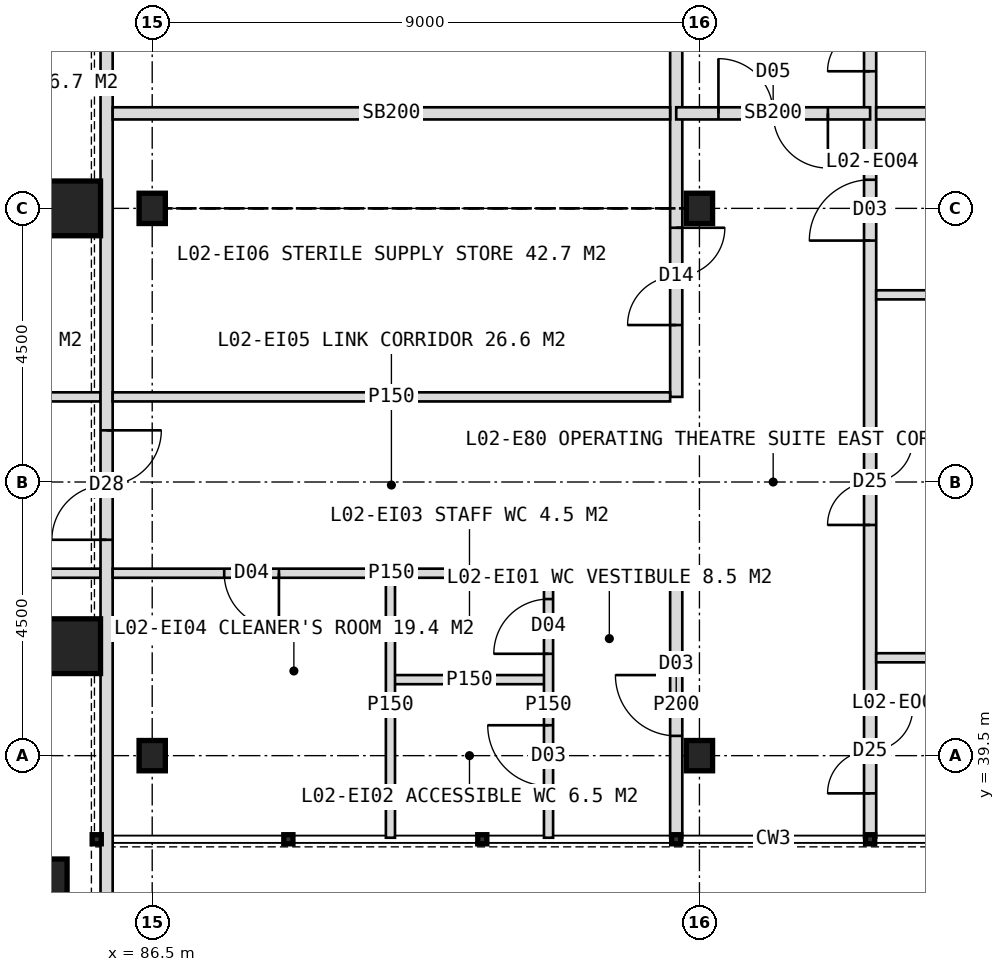
"""IFC4 building model, lengths in metres.
Left out: names, types, materials, properties, quantities, classifications, styles, units other than length and angle.
Written with IfcOpenShell. Run it as: python <this file> out.ifc"""

import sys

from ifc_helpers import new_model, si_unit, direction, frame, frame_2d, origin, origin_2d, place, context, subcontext, project, spatial, rectangle, hollow_rectangle, i_section, extrude, element, fill, save


model = new_model("IFC4")
c1 = context("Model", 3, precision=1e-05, world=origin(), true_north=direction((0.0, 1.0)))
c2 = subcontext(c1, "Body", "Model", "MODEL_VIEW")
j1 = project(units=[si_unit("LENGTHUNIT", "METRE"), si_unit("PLANEANGLEUNIT", "RADIAN")], contexts=[c1])
p1 = place(None, origin())
s1 = spatial("IfcSite", under=j1, at=p1, CompositionType="ELEMENT")
p2 = place(p1, origin())
s2 = spatial("IfcBuilding", under=s1, at=p2, CompositionType="ELEMENT")
p3 = place(p2, frame((0.0, 0.0, 11.0)))
s3 = spatial("IfcBuildingStorey", under=s2, at=p3, CompositionType="ELEMENT", Elevation=11.0)
for number, where, z_axis, x_axis in (
    (1, (85.2, 41.3, 0.0), (0.0, 0.0, 1.0), (1.0, 0.0, 0.0)),
    (2, (85.2, 48.5, 0.0), (0.0, 0.0, 1.0), (1.0, 0.0, 0.0)),
    (3, (84.65, 37.35, 0.0), (0.0, 0.0, 1.0), (1.0, 0.0, 0.0)),
):
    element("IfcColumn", number, at=place(p3, frame(where, z_axis=z_axis, x_axis=x_axis)), inside=s3, PredefinedType="COLUMN", context=c2, shape_type="SweptSolid", body=[
        extrude(hollow_rectangle(XDim=0.9, YDim=0.9, WallThickness=0.08, at=origin_2d()), origin(), (0.0, 0.0, 1.0), 5.5),
    ])
for number, where, z_axis, x_axis in (
    (4, (86.5, 39.5, 0.0), (0.0, 0.0, 1.0), (1.0, 0.0, 0.0)),
    (5, (86.5, 48.5, 0.0), (0.0, 0.0, 1.0), (1.0, 0.0, 0.0)),
    (6, (95.5, 39.5, 0.0), (0.0, 0.0, 1.0), (1.0, 0.0, 0.0)),
    (7, (95.5, 48.5, 0.0), (0.0, 0.0, 1.0), (1.0, 0.0, 0.0)),
):
    element("IfcColumn", number, at=place(p3, frame(where, z_axis=z_axis, x_axis=x_axis)), inside=s3, PredefinedType="COLUMN", context=c2, shape_type="SweptSolid", body=[
        extrude(i_section(OverallWidth=0.432, OverallDepth=0.498, WebThickness=0.056, FlangeThickness=0.089, FilletRadius=0.015, at=origin_2d()), origin(), (0.0, 0.0, 1.0), 5.5),
    ])
for number, where, z_axis, x_axis in (
    (8, (79.5, 45.4, 0.0), (0.0, 0.0, 1.0), (1.0, 0.0, 0.0)),
    (9, (79.5, 42.5, 0.0), (0.0, 0.0, 1.0), (1.0, 0.0, 0.0)),
):
    element("IfcWall", number, at=place(p3, frame(where, z_axis=z_axis, x_axis=x_axis)), inside=s3, PredefinedType="PARTITIONING", context=c2, shape_type="SweptSolid", body=[
        extrude(rectangle(XDim=6.15, YDim=0.15, at=frame_2d((3.075, 0.0))), origin(), (0.0, 0.0, 1.0), 5.2),
    ])
p4 = place(p3, frame((98.307, 38.15, 0.0), z_axis=(0.0, 0.0, 1.0), x_axis=(0.0, 1.0, 0.0)))
e10 = element("IfcWall", 10, at=p4, inside=s3, PredefinedType="PARTITIONING", context=c2, shape_type="SweptSolid", body=[
    extrude(rectangle(XDim=47.7, YDim=0.2, at=frame_2d((23.85, 0.0))), origin(), (0.0, 0.0, 1.0), 5.2),
])
p5 = place(p4, frame((45.7, 0.0, 0.0)))
e11 = element("IfcOpeningElement", 11, at=p5, cuts=e10, PredefinedType="OPENING", context=c2, shape_type="SweptSolid", body=[
    extrude(rectangle(XDim=1.2, YDim=2.1, at=frame_2d((0.6, 1.05))), frame((0.0, 0.11, 0.0), z_axis=(0.0, -1.0, 0.0), x_axis=(1.0, 0.0, 0.0)), (0.0, 0.0, 1.0), 0.22),
])
p6 = place(p4, frame((36.244, 0.0, 0.0)))
e12 = element("IfcOpeningElement", 12, at=p6, cuts=e10, PredefinedType="OPENING", context=c2, shape_type="SweptSolid", body=[
    extrude(rectangle(XDim=1.0, YDim=2.1, at=frame_2d((0.5, 1.05))), frame((0.0, 0.11, 0.0), z_axis=(0.0, -1.0, 0.0), x_axis=(1.0, 0.0, 0.0)), (0.0, 0.0, 1.0), 0.22),
])
p7 = place(p4, frame((0.73, 0.0, 0.0)))
e13 = element("IfcOpeningElement", 13, at=p7, cuts=e10, PredefinedType="OPENING", context=c2, shape_type="SweptSolid", body=[
    extrude(rectangle(XDim=1.4, YDim=2.2, at=frame_2d((0.7, 1.1))), frame((0.0, 0.11, 0.0), z_axis=(0.0, -1.0, 0.0), x_axis=(1.0, 0.0, 0.0)), (0.0, 0.0, 1.0), 0.22),
])
p8 = place(p4, frame((5.144, 0.0, 0.0)))
e14 = element("IfcOpeningElement", 14, at=p8, cuts=e10, PredefinedType="OPENING", context=c2, shape_type="SweptSolid", body=[
    extrude(rectangle(XDim=1.4, YDim=2.2, at=frame_2d((0.7, 1.1))), frame((0.0, 0.11, 0.0), z_axis=(0.0, -1.0, 0.0), x_axis=(1.0, 0.0, 0.0)), (0.0, 0.0, 1.0), 0.22),
])
p9 = place(p4, frame((9.82, 0.0, 0.0)))
e15 = element("IfcOpeningElement", 15, at=p9, cuts=e10, PredefinedType="OPENING", context=c2, shape_type="SweptSolid", body=[
    extrude(rectangle(XDim=1.0, YDim=2.1, at=frame_2d((0.5, 1.05))), frame((0.0, 0.11, 0.0), z_axis=(0.0, -1.0, 0.0), x_axis=(1.0, 0.0, 0.0)), (0.0, 0.0, 1.0), 0.22),
])
p10 = place(p4, frame((12.605, 0.0, 0.0)))
e16 = element("IfcOpeningElement", 16, at=p10, cuts=e10, PredefinedType="OPENING", context=c2, shape_type="SweptSolid", body=[
    extrude(rectangle(XDim=1.4, YDim=2.2, at=frame_2d((0.7, 1.1))), frame((0.0, 0.11, 0.0), z_axis=(0.0, -1.0, 0.0), x_axis=(1.0, 0.0, 0.0)), (0.0, 0.0, 1.0), 0.22),
])
p11 = place(p4, frame((17.081, 0.0, 0.0)))
e17 = element("IfcOpeningElement", 17, at=p11, cuts=e10, PredefinedType="OPENING", context=c2, shape_type="SweptSolid", body=[
    extrude(rectangle(XDim=1.4, YDim=2.2, at=frame_2d((0.7, 1.1))), frame((0.0, 0.11, 0.0), z_axis=(0.0, -1.0, 0.0), x_axis=(1.0, 0.0, 0.0)), (0.0, 0.0, 1.0), 0.22),
])
p12 = place(p4, frame((21.758, 0.0, 0.0)))
e18 = element("IfcOpeningElement", 18, at=p12, cuts=e10, PredefinedType="OPENING", context=c2, shape_type="SweptSolid", body=[
    extrude(rectangle(XDim=1.0, YDim=2.1, at=frame_2d((0.5, 1.05))), frame((0.0, 0.11, 0.0), z_axis=(0.0, -1.0, 0.0), x_axis=(1.0, 0.0, 0.0)), (0.0, 0.0, 1.0), 0.22),
])
p13 = place(p4, frame((24.542, 0.0, 0.0)))
e19 = element("IfcOpeningElement", 19, at=p13, cuts=e10, PredefinedType="OPENING", context=c2, shape_type="SweptSolid", body=[
    extrude(rectangle(XDim=1.4, YDim=2.2, at=frame_2d((0.7, 1.1))), frame((0.0, 0.11, 0.0), z_axis=(0.0, -1.0, 0.0), x_axis=(1.0, 0.0, 0.0)), (0.0, 0.0, 1.0), 0.22),
])
p14 = place(p4, frame((29.019, 0.0, 0.0)))
e20 = element("IfcOpeningElement", 20, at=p14, cuts=e10, PredefinedType="OPENING", context=c2, shape_type="SweptSolid", body=[
    extrude(rectangle(XDim=1.4, YDim=2.2, at=frame_2d((0.7, 1.1))), frame((0.0, 0.11, 0.0), z_axis=(0.0, -1.0, 0.0), x_axis=(1.0, 0.0, 0.0)), (0.0, 0.0, 1.0), 0.22),
])
p15 = place(p4, frame((33.695, 0.0, 0.0)))
e21 = element("IfcOpeningElement", 21, at=p15, cuts=e10, PredefinedType="OPENING", context=c2, shape_type="SweptSolid", body=[
    extrude(rectangle(XDim=1.0, YDim=2.1, at=frame_2d((0.5, 1.05))), frame((0.0, 0.11, 0.0), z_axis=(0.0, -1.0, 0.0), x_axis=(1.0, 0.0, 0.0)), (0.0, 0.0, 1.0), 0.22),
])
p16 = place(p3, frame((95.118, 38.15, 0.0), z_axis=(0.0, 0.0, 1.0), x_axis=(0.0, 1.0, 0.0)))
e22 = element("IfcWall", 22, at=p16, inside=s3, PredefinedType="PARTITIONING", context=c2, shape_type="SweptSolid", body=[
    extrude(rectangle(XDim=4.35, YDim=0.2, at=frame_2d((2.175, 0.0))), origin(), (0.0, 0.0, 1.0), 5.2),
])
p17 = place(p16, frame((1.675, 0.0, 0.0)))
e23 = element("IfcOpeningElement", 23, at=p17, cuts=e22, PredefinedType="OPENING", context=c2, shape_type="SweptSolid", body=[
    extrude(rectangle(XDim=1.0, YDim=2.1, at=frame_2d((0.5, 1.05))), frame((0.0, 0.11, 0.0), z_axis=(0.0, -1.0, 0.0), x_axis=(1.0, 0.0, 0.0)), (0.0, 0.0, 1.0), 0.22),
])
p18 = place(p3, frame((95.118, 45.4, 0.0), z_axis=(0.0, 0.0, 1.0), x_axis=(0.0, 1.0, 0.0)))
e24 = element("IfcWall", 24, at=p18, inside=s3, PredefinedType="PARTITIONING", context=c2, shape_type="SweptSolid", body=[
    extrude(rectangle(XDim=16.6, YDim=0.2, at=frame_2d((8.3, 0.0))), origin(), (0.0, 0.0, 1.0), 5.2),
])
p19 = place(p18, frame((1.181, 0.0, 0.0)))
e25 = element("IfcOpeningElement", 25, at=p19, cuts=e24, PredefinedType="OPENING", context=c2, shape_type="SweptSolid", body=[
    extrude(rectangle(XDim=1.6, YDim=2.2, at=frame_2d((0.8, 1.1))), frame((0.0, 0.11, 0.0), z_axis=(0.0, -1.0, 0.0), x_axis=(1.0, 0.0, 0.0)), (0.0, 0.0, 1.0), 0.22),
])
p20 = place(p18, frame((7.881, 0.0, 0.0)))
e26 = element("IfcOpeningElement", 26, at=p20, cuts=e24, PredefinedType="OPENING", context=c2, shape_type="SweptSolid", body=[
    extrude(rectangle(XDim=1.0, YDim=2.1, at=frame_2d((0.5, 1.05))), frame((0.0, 0.11, 0.0), z_axis=(0.0, -1.0, 0.0), x_axis=(1.0, 0.0, 0.0)), (0.0, 0.0, 1.0), 0.22),
])
p21 = place(p18, frame((13.65, 0.0, 0.0)))
e27 = element("IfcOpeningElement", 27, at=p21, cuts=e24, PredefinedType="OPENING", context=c2, shape_type="SweptSolid", body=[
    extrude(rectangle(XDim=1.4, YDim=2.2, at=frame_2d((0.7, 1.1))), frame((0.0, 0.11, 0.0), z_axis=(0.0, -1.0, 0.0), x_axis=(1.0, 0.0, 0.0)), (0.0, 0.0, 1.0), 0.22),
])
p22 = place(p3, frame((98.307, 50.062, 0.0), z_axis=(0.0, 0.0, 1.0), x_axis=(-1.0, 0.0, 0.0)))
e28 = element("IfcWall", 28, at=p22, inside=s3, PredefinedType="SOLIDWALL", context=c2, shape_type="SweptSolid", body=[
    extrude(rectangle(XDim=3.189, YDim=0.2, at=frame_2d((1.594, 0.0))), origin(), (0.0, 0.0, 1.0), 5.2),
])
p23 = place(p22, frame((0.695, 0.0, 0.0)))
e29 = element("IfcOpeningElement", 29, at=p23, cuts=e28, PredefinedType="OPENING", context=c2, shape_type="SweptSolid", body=[
    extrude(rectangle(XDim=1.8, YDim=2.2, at=frame_2d((0.9, 1.1))), frame((0.0, 0.11, 0.0), z_axis=(0.0, -1.0, 0.0), x_axis=(1.0, 0.0, 0.0)), (0.0, 0.0, 1.0), 0.22),
])
p24 = place(p3, frame((85.75, 36.8, 0.0), z_axis=(0.0, 0.0, 1.0), x_axis=(0.0, 1.0, 0.0)))
e30 = element("IfcWall", 30, at=p24, inside=s3, PredefinedType="SOLIDWALL", context=c2, shape_type="SweptSolid", body=[
    extrude(rectangle(XDim=50.4, YDim=0.2, at=frame_2d((25.2, 0.0))), origin(), (0.0, 0.0, 1.0), 5.2),
])
p25 = place(p24, frame((6.25, 0.0, 0.0)))
e31 = element("IfcOpeningElement", 31, at=p25, cuts=e30, PredefinedType="OPENING", context=c2, shape_type="SweptSolid", body=[
    extrude(rectangle(XDim=1.8, YDim=2.2, at=frame_2d((0.9, 1.1))), frame((0.0, 0.11, 0.0), z_axis=(0.0, -1.0, 0.0), x_axis=(1.0, 0.0, 0.0)), (0.0, 0.0, 1.0), 0.22),
])
p26 = place(p24, frame((25.55, 0.0, 0.0)))
e32 = element("IfcOpeningElement", 32, at=p26, cuts=e30, PredefinedType="OPENING", context=c2, shape_type="SweptSolid", body=[
    extrude(rectangle(XDim=1.8, YDim=2.2, at=frame_2d((0.9, 1.1))), frame((0.0, 0.11, 0.0), z_axis=(0.0, -1.0, 0.0), x_axis=(1.0, 0.0, 0.0)), (0.0, 0.0, 1.0), 0.22),
])
p27 = place(p3, frame((107.85, 41.109, 0.0), z_axis=(0.0, 0.0, 1.0), x_axis=(-1.0, 0.0, 0.0)))
e33 = element("IfcWall", 33, at=p27, inside=s3, PredefinedType="PARTITIONING", context=c2, shape_type="SweptSolid", body=[
    extrude(rectangle(XDim=9.443, YDim=0.15, at=frame_2d((4.722, 0.0))), origin(), (0.0, 0.0, 1.0), 5.2),
])
p28 = place(p27, frame((5.993, 0.0, 0.0)))
e34 = element("IfcOpeningElement", 34, at=p28, cuts=e33, PredefinedType="OPENING", context=c2, shape_type="SweptSolid", body=[
    extrude(rectangle(XDim=1.4, YDim=2.2, at=frame_2d((0.7, 1.1))), frame((0.0, 0.085, 0.0), z_axis=(0.0, -1.0, 0.0), x_axis=(1.0, 0.0, 0.0)), (0.0, 0.0, 1.0), 0.17),
])
p29 = place(p27, frame((1.521, 0.0, 0.0)))
e35 = element("IfcOpeningElement", 35, at=p29, cuts=e33, PredefinedType="OPENING", context=c2, shape_type="SweptSolid", body=[
    extrude(rectangle(XDim=1.0, YDim=2.1, at=frame_2d((0.5, 1.05))), frame((0.0, 0.085, 0.0), z_axis=(0.0, -1.0, 0.0), x_axis=(1.0, 0.0, 0.0)), (0.0, 0.0, 1.0), 0.17),
])
p30 = place(p3, frame((107.85, 47.078, 0.0), z_axis=(0.0, 0.0, 1.0), x_axis=(-1.0, 0.0, 0.0)))
e36 = element("IfcWall", 36, at=p30, inside=s3, PredefinedType="PARTITIONING", context=c2, shape_type="SweptSolid", body=[
    extrude(rectangle(XDim=9.443, YDim=0.15, at=frame_2d((4.722, 0.0))), origin(), (0.0, 0.0, 1.0), 5.2),
])
p31 = place(p30, frame((7.193, 0.0, 0.0)))
e37 = element("IfcOpeningElement", 37, at=p31, cuts=e36, PredefinedType="OPENING", context=c2, shape_type="SweptSolid", body=[
    extrude(rectangle(XDim=1.0, YDim=2.1, at=frame_2d((0.5, 1.05))), frame((0.0, 0.085, 0.0), z_axis=(0.0, -1.0, 0.0), x_axis=(1.0, 0.0, 0.0)), (0.0, 0.0, 1.0), 0.17),
])
p32 = place(p30, frame((2.271, 0.0, 0.0)))
e38 = element("IfcOpeningElement", 38, at=p32, cuts=e36, PredefinedType="OPENING", context=c2, shape_type="SweptSolid", body=[
    extrude(rectangle(XDim=1.0, YDim=2.1, at=frame_2d((0.5, 1.05))), frame((0.0, 0.085, 0.0), z_axis=(0.0, -1.0, 0.0), x_axis=(1.0, 0.0, 0.0)), (0.0, 0.0, 1.0), 0.17),
])
p33 = place(p3, frame((107.85, 50.062, 0.0), z_axis=(0.0, 0.0, 1.0), x_axis=(-1.0, 0.0, 0.0)))
e39 = element("IfcWall", 39, at=p33, inside=s3, PredefinedType="SOLIDWALL", context=c2, shape_type="SweptSolid", body=[
    extrude(rectangle(XDim=9.443, YDim=0.2, at=frame_2d((4.722, 0.0))), origin(), (0.0, 0.0, 1.0), 5.2),
])
p34 = place(p3, frame((93.018, 40.75, 0.0), z_axis=(0.0, 0.0, 1.0), x_axis=(-1.0, 0.0, 0.0)))
e40 = element("IfcWall", 40, at=p34, inside=s3, PredefinedType="PARTITIONING", context=c2, shape_type="SweptSolid", body=[
    extrude(rectangle(XDim=2.6, YDim=0.15, at=frame_2d((1.3, 0.0))), origin(), (0.0, 0.0, 1.0), 5.2),
])
p35 = place(p3, frame((95.018, 42.5, 0.0), z_axis=(0.0, 0.0, 1.0), x_axis=(-1.0, 0.0, 0.0)))
e41 = element("IfcWall", 41, at=p35, inside=s3, PredefinedType="PARTITIONING", context=c2, shape_type="SweptSolid", body=[
    extrude(rectangle(XDim=9.168, YDim=0.15, at=frame_2d((4.584, 0.0))), origin(), (0.0, 0.0, 1.0), 5.2),
])
p36 = place(p35, frame((6.434, 0.0, 0.0)))
e42 = element("IfcOpeningElement", 42, at=p36, cuts=e41, PredefinedType="OPENING", context=c2, shape_type="SweptSolid", body=[
    extrude(rectangle(XDim=0.9, YDim=2.1, at=frame_2d((0.45, 1.05))), frame((0.0, 0.085, 0.0), z_axis=(0.0, -1.0, 0.0), x_axis=(1.0, 0.0, 0.0)), (0.0, 0.0, 1.0), 0.17),
])
p37 = place(p3, frame((95.018, 45.4, 0.0), z_axis=(0.0, 0.0, 1.0), x_axis=(-1.0, 0.0, 0.0)))
e43 = element("IfcWall", 43, at=p37, inside=s3, PredefinedType="PARTITIONING", context=c2, shape_type="SweptSolid", body=[
    extrude(rectangle(XDim=9.168, YDim=0.15, at=frame_2d((4.584, 0.0))), origin(), (0.0, 0.0, 1.0), 5.2),
])
p38 = place(p3, frame((95.018, 50.062, 0.0), z_axis=(0.0, 0.0, 1.0), x_axis=(-1.0, 0.0, 0.0)))
e44 = element("IfcWall", 44, at=p38, inside=s3, PredefinedType="SOLIDWALL", context=c2, shape_type="SweptSolid", body=[
    extrude(rectangle(XDim=9.168, YDim=0.2, at=frame_2d((4.584, 0.0))), origin(), (0.0, 0.0, 1.0), 5.2),
])
p39 = place(p3, frame((93.018, 38.15, 0.0), z_axis=(0.0, 0.0, 1.0), x_axis=(0.0, 1.0, 0.0)))
e45 = element("IfcWall", 45, at=p39, inside=s3, PredefinedType="PARTITIONING", context=c2, shape_type="SweptSolid", body=[
    extrude(rectangle(XDim=4.35, YDim=0.15, at=frame_2d((2.175, 0.0))), origin(), (0.0, 0.0, 1.0), 5.2),
])
p40 = place(p39, frame((0.85, 0.0, 0.0)))
e46 = element("IfcOpeningElement", 46, at=p40, cuts=e45, PredefinedType="OPENING", context=c2, shape_type="SweptSolid", body=[
    extrude(rectangle(XDim=1.0, YDim=2.1, at=frame_2d((0.5, 1.05))), frame((0.0, 0.085, 0.0), z_axis=(0.0, -1.0, 0.0), x_axis=(1.0, 0.0, 0.0)), (0.0, 0.0, 1.0), 0.17),
])
p41 = place(p39, frame((3.025, 0.0, 0.0)))
e47 = element("IfcOpeningElement", 47, at=p41, cuts=e45, PredefinedType="OPENING", context=c2, shape_type="SweptSolid", body=[
    extrude(rectangle(XDim=0.9, YDim=2.1, at=frame_2d((0.45, 1.05))), frame((0.0, 0.085, 0.0), z_axis=(0.0, -1.0, 0.0), x_axis=(1.0, 0.0, 0.0)), (0.0, 0.0, 1.0), 0.17),
])
p42 = place(p3, frame((90.418, 38.15, 0.0), z_axis=(0.0, 0.0, 1.0), x_axis=(0.0, 1.0, 0.0)))
e48 = element("IfcWall", 48, at=p42, inside=s3, PredefinedType="PARTITIONING", context=c2, shape_type="SweptSolid", body=[
    extrude(rectangle(XDim=4.35, YDim=0.15, at=frame_2d((2.175, 0.0))), origin(), (0.0, 0.0, 1.0), 5.2),
])
p43 = place(p23, origin())
e49 = element("IfcDoor", 49, at=p43, inside=s3, OperationType="DOUBLE_DOOR_DOUBLE_SWING", PredefinedType="DOOR", context=c2, shape_type="SweptSolid", body=[
    extrude(rectangle(XDim=1.8, YDim=2.2, at=frame_2d((0.9, 1.1))), frame((0.0, 0.025, 0.0), z_axis=(0.0, -1.0, 0.0), x_axis=(1.0, 0.0, 0.0)), (0.0, 0.0, 1.0), 0.05),
])
fill(e29, e49)
p44 = place(p25, origin())
e50 = element("IfcDoor", 50, at=p44, inside=s3, OperationType="DOUBLE_DOOR_SINGLE_SWING", PredefinedType="DOOR", context=c2, shape_type="SweptSolid", body=[
    extrude(rectangle(XDim=1.8, YDim=2.2, at=frame_2d((0.9, 1.1))), frame((0.0, 0.025, 0.0), z_axis=(0.0, -1.0, 0.0), x_axis=(1.0, 0.0, 0.0)), (0.0, 0.0, 1.0), 0.05),
])
fill(e31, e50)
p45 = place(p7, origin())
e51 = element("IfcDoor", 51, at=p45, inside=s3, OperationType="DOUBLE_DOOR_SINGLE_SWING", PredefinedType="DOOR", context=c2, shape_type="SweptSolid", body=[
    extrude(rectangle(XDim=1.4, YDim=2.2, at=frame_2d((0.7, 1.1))), frame((0.0, 0.025, 0.0), z_axis=(0.0, -1.0, 0.0), x_axis=(1.0, 0.0, 0.0)), (0.0, 0.0, 1.0), 0.05),
])
fill(e13, e51)
p46 = place(p8, origin())
e52 = element("IfcDoor", 52, at=p46, inside=s3, OperationType="DOUBLE_DOOR_SINGLE_SWING", PredefinedType="DOOR", context=c2, shape_type="SweptSolid", body=[
    extrude(rectangle(XDim=1.4, YDim=2.2, at=frame_2d((0.7, 1.1))), frame((0.0, 0.025, 0.0), z_axis=(0.0, -1.0, 0.0), x_axis=(1.0, 0.0, 0.0)), (0.0, 0.0, 1.0), 0.05),
])
fill(e14, e52)
p47 = place(p9, origin())
e53 = element("IfcDoor", 53, at=p47, inside=s3, OperationType="SINGLE_SWING_LEFT", PredefinedType="DOOR", context=c2, shape_type="SweptSolid", body=[
    extrude(rectangle(XDim=1.0, YDim=2.1, at=frame_2d((0.5, 1.05))), frame((0.0, 0.025, 0.0), z_axis=(0.0, -1.0, 0.0), x_axis=(1.0, 0.0, 0.0)), (0.0, 0.0, 1.0), 0.05),
])
fill(e15, e53)
p48 = place(p10, origin())
e54 = element("IfcDoor", 54, at=p48, inside=s3, OperationType="DOUBLE_DOOR_SINGLE_SWING", PredefinedType="DOOR", context=c2, shape_type="SweptSolid", body=[
    extrude(rectangle(XDim=1.4, YDim=2.2, at=frame_2d((0.7, 1.1))), frame((0.0, 0.025, 0.0), z_axis=(0.0, -1.0, 0.0), x_axis=(1.0, 0.0, 0.0)), (0.0, 0.0, 1.0), 0.05),
])
fill(e16, e54)
p49 = place(p17, origin())
e55 = element("IfcDoor", 55, at=p49, inside=s3, OperationType="SINGLE_SWING_RIGHT", PredefinedType="DOOR", context=c2, shape_type="SweptSolid", body=[
    extrude(rectangle(XDim=1.0, YDim=2.1, at=frame_2d((0.5, 1.05))), frame((0.0, 0.025, 0.0), z_axis=(0.0, -1.0, 0.0), x_axis=(1.0, 0.0, 0.0)), (0.0, 0.0, 1.0), 0.05),
])
fill(e23, e55)
p50 = place(p40, origin())
e56 = element("IfcDoor", 56, at=p50, inside=s3, OperationType="SINGLE_SWING_RIGHT", PredefinedType="DOOR", context=c2, shape_type="SweptSolid", body=[
    extrude(rectangle(XDim=1.0, YDim=2.1, at=frame_2d((0.5, 1.05))), frame((0.0, 0.025, 0.0), z_axis=(0.0, -1.0, 0.0), x_axis=(1.0, 0.0, 0.0)), (0.0, 0.0, 1.0), 0.05),
])
fill(e46, e56)
p51 = place(p41, origin())
e57 = element("IfcDoor", 57, at=p51, inside=s3, OperationType="SINGLE_SWING_LEFT", PredefinedType="DOOR", context=c2, shape_type="SweptSolid", body=[
    extrude(rectangle(XDim=0.9, YDim=2.1, at=frame_2d((0.45, 1.05))), frame((0.0, 0.025, 0.0), z_axis=(0.0, -1.0, 0.0), x_axis=(1.0, 0.0, 0.0)), (0.0, 0.0, 1.0), 0.05),
])
fill(e47, e57)
p52 = place(p36, origin())
e58 = element("IfcDoor", 58, at=p52, inside=s3, OperationType="SINGLE_SWING_LEFT", PredefinedType="DOOR", context=c2, shape_type="SweptSolid", body=[
    extrude(rectangle(XDim=0.9, YDim=2.1, at=frame_2d((0.45, 1.05))), frame((0.0, 0.025, 0.0), z_axis=(0.0, -1.0, 0.0), x_axis=(1.0, 0.0, 0.0)), (0.0, 0.0, 1.0), 0.05),
])
fill(e42, e58)
p53 = place(p19, origin())
e59 = element("IfcDoor", 59, at=p53, inside=s3, OperationType="DOUBLE_DOOR_DOUBLE_SWING", PredefinedType="DOOR", context=c2, shape_type="SweptSolid", body=[
    extrude(rectangle(XDim=1.6, YDim=2.2, at=frame_2d((0.8, 1.1))), frame((0.0, 0.025, 0.0), z_axis=(0.0, -1.0, 0.0), x_axis=(1.0, 0.0, 0.0)), (0.0, 0.0, 1.0), 0.05),
])
fill(e25, e59)
save(model, sys.argv[1])
